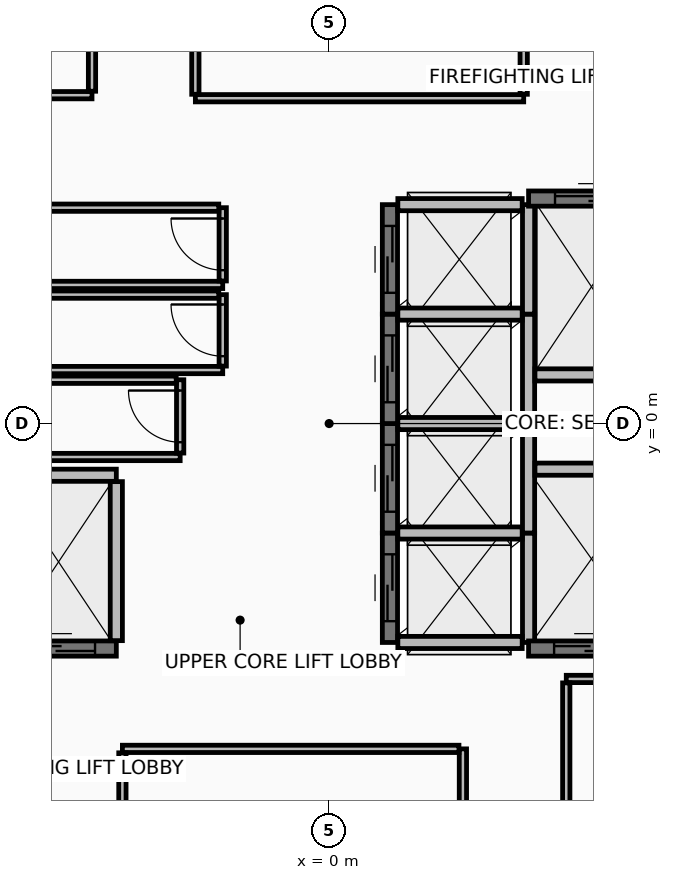
"""IFC4 building model, lengths in metres.
Left out: names, types, materials, properties, quantities, classifications, styles, units other than length and angle.
Written with IfcOpenShell. Run it as: python <this file> out.ifc"""

import sys

from ifc_helpers import new_model, si_unit, direction, frame, frame_2d, origin, place, context, subcontext, project, spatial, rectangle, extrude, element, fill, save


model = new_model("IFC4")
c1 = context("Model", 3, precision=1e-05, world=origin(), true_north=direction((0.0, 1.0)))
c2 = subcontext(c1, "Body", "Model", "MODEL_VIEW")
j1 = project(units=[si_unit("LENGTHUNIT", "METRE"), si_unit("PLANEANGLEUNIT", "RADIAN")], contexts=[c1])
p1 = place(None, origin())
s1 = spatial("IfcSite", under=j1, at=p1, CompositionType="ELEMENT")
p2 = place(p1, origin())
s2 = spatial("IfcBuilding", under=s1, at=p2, CompositionType="ELEMENT")
p3 = place(p2, frame((0.0, 0.0, 275.0)))
s3 = spatial("IfcBuildingStorey", under=s2, at=p3, CompositionType="ELEMENT", Elevation=275.0)
p4 = place(p3, frame((1.0, -3.6, 0.0), z_axis=(0.0, 0.0, 1.0), x_axis=(0.0, 1.0, 0.0)))
e1 = element("IfcWall", 1, at=p4, inside=s3, PredefinedType="SHEAR", context=c2, shape_type="SweptSolid", body=[
    extrude(rectangle(XDim=1.8, YDim=0.25, at=frame_2d((0.9, 0.0))), origin(), (0.0, 0.0, 1.0), 4.56),
])
p5 = place(p4, frame((0.35, 0.0, 0.0)))
e2 = element("IfcOpeningElement", 2, at=p5, cuts=e1, PredefinedType="OPENING", context=c2, shape_type="SweptSolid", body=[
    extrude(rectangle(XDim=1.1, YDim=2.2, at=frame_2d((0.55, 1.1))), frame((0.0, 0.135, 0.0), z_axis=(0.0, -1.0, 0.0), x_axis=(1.0, 0.0, 0.0)), (0.0, 0.0, 1.0), 0.27),
])
p6 = place(p3, frame((3.28, -3.6, 0.0), z_axis=(0.0, 0.0, 1.0), x_axis=(0.0, 1.0, 0.0)))
e3 = element("IfcWall", 3, at=p6, inside=s3, PredefinedType="PARTITIONING", context=c2, shape_type="SweptSolid", body=[
    extrude(rectangle(XDim=1.8, YDim=0.2, at=frame_2d((0.9, 0.0))), origin(), (0.0, 0.0, 1.0), 4.56),
])
for number, where, z_axis, x_axis in (
    (4, (1.13, -3.6, 0.0), (0.0, 0.0, 1.0), (1.0, 0.0, 0.0)),
    (5, (1.13, -1.8, 0.0), (0.0, 0.0, 1.0), (1.0, 0.0, 0.0)),
):
    element("IfcWall", number, at=place(p3, frame(where, z_axis=z_axis, x_axis=x_axis)), inside=s3, PredefinedType="PARTITIONING", context=c2, shape_type="SweptSolid", body=[
        extrude(rectangle(XDim=2.045, YDim=0.2, at=frame_2d((1.022, 0.0))), origin(), (0.0, 0.0, 1.0), 4.56),
    ])
p7 = place(p3, frame((1.0, -1.8, 0.0), z_axis=(0.0, 0.0, 1.0), x_axis=(0.0, 1.0, 0.0)))
e6 = element("IfcWall", 6, at=p7, inside=s3, PredefinedType="SHEAR", context=c2, shape_type="SweptSolid", body=[
    extrude(rectangle(XDim=1.8, YDim=0.25, at=frame_2d((0.9, 0.0))), origin(), (0.0, 0.0, 1.0), 4.56),
])
p8 = place(p7, frame((0.35, 0.0, 0.0)))
e7 = element("IfcOpeningElement", 7, at=p8, cuts=e6, PredefinedType="OPENING", context=c2, shape_type="SweptSolid", body=[
    extrude(rectangle(XDim=1.1, YDim=2.2, at=frame_2d((0.55, 1.1))), frame((0.0, 0.135, 0.0), z_axis=(0.0, -1.0, 0.0), x_axis=(1.0, 0.0, 0.0)), (0.0, 0.0, 1.0), 0.27),
])
p9 = place(p3, frame((3.28, -1.8, 0.0), z_axis=(0.0, 0.0, 1.0), x_axis=(0.0, 1.0, 0.0)))
e8 = element("IfcWall", 8, at=p9, inside=s3, PredefinedType="PARTITIONING", context=c2, shape_type="SweptSolid", body=[
    extrude(rectangle(XDim=1.8, YDim=0.2, at=frame_2d((0.9, 0.0))), origin(), (0.0, 0.0, 1.0), 4.56),
])
p10 = place(p3, frame((1.13, 0.0, 0.0), z_axis=(0.0, 0.0, 1.0), x_axis=(1.0, 0.0, 0.0)))
e9 = element("IfcWall", 9, at=p10, inside=s3, PredefinedType="PARTITIONING", context=c2, shape_type="SweptSolid", body=[
    extrude(rectangle(XDim=2.045, YDim=0.2, at=frame_2d((1.022, 0.0))), origin(), (0.0, 0.0, 1.0), 4.56),
])
p11 = place(p3, frame((1.0, 0.0, 0.0), z_axis=(0.0, 0.0, 1.0), x_axis=(0.0, 1.0, 0.0)))
e10 = element("IfcWall", 10, at=p11, inside=s3, PredefinedType="SHEAR", context=c2, shape_type="SweptSolid", body=[
    extrude(rectangle(XDim=1.8, YDim=0.25, at=frame_2d((0.9, 0.0))), origin(), (0.0, 0.0, 1.0), 4.56),
])
p12 = place(p11, frame((0.35, 0.0, 0.0)))
e11 = element("IfcOpeningElement", 11, at=p12, cuts=e10, PredefinedType="OPENING", context=c2, shape_type="SweptSolid", body=[
    extrude(rectangle(XDim=1.1, YDim=2.2, at=frame_2d((0.55, 1.1))), frame((0.0, 0.135, 0.0), z_axis=(0.0, -1.0, 0.0), x_axis=(1.0, 0.0, 0.0)), (0.0, 0.0, 1.0), 0.27),
])
p13 = place(p3, frame((3.28, 0.0, 0.0), z_axis=(0.0, 0.0, 1.0), x_axis=(0.0, 1.0, 0.0)))
e12 = element("IfcWall", 12, at=p13, inside=s3, PredefinedType="PARTITIONING", context=c2, shape_type="SweptSolid", body=[
    extrude(rectangle(XDim=1.8, YDim=0.2, at=frame_2d((0.9, 0.0))), origin(), (0.0, 0.0, 1.0), 4.56),
])
p14 = place(p3, frame((1.13, 1.8, 0.0), z_axis=(0.0, 0.0, 1.0), x_axis=(1.0, 0.0, 0.0)))
e13 = element("IfcWall", 13, at=p14, inside=s3, PredefinedType="PARTITIONING", context=c2, shape_type="SweptSolid", body=[
    extrude(rectangle(XDim=2.045, YDim=0.2, at=frame_2d((1.022, 0.0))), origin(), (0.0, 0.0, 1.0), 4.56),
])
p15 = place(p3, frame((1.0, 1.8, 0.0), z_axis=(0.0, 0.0, 1.0), x_axis=(0.0, 1.0, 0.0)))
e14 = element("IfcWall", 14, at=p15, inside=s3, PredefinedType="SHEAR", context=c2, shape_type="SweptSolid", body=[
    extrude(rectangle(XDim=1.8, YDim=0.25, at=frame_2d((0.9, 0.0))), origin(), (0.0, 0.0, 1.0), 4.56),
])
p16 = place(p15, frame((0.35, 0.0, 0.0)))
e15 = element("IfcOpeningElement", 15, at=p16, cuts=e14, PredefinedType="OPENING", context=c2, shape_type="SweptSolid", body=[
    extrude(rectangle(XDim=1.1, YDim=2.2, at=frame_2d((0.55, 1.1))), frame((0.0, 0.135, 0.0), z_axis=(0.0, -1.0, 0.0), x_axis=(1.0, 0.0, 0.0)), (0.0, 0.0, 1.0), 0.27),
])
p17 = place(p3, frame((3.28, 1.8, 0.0), z_axis=(0.0, 0.0, 1.0), x_axis=(0.0, 1.0, 0.0)))
e16 = element("IfcWall", 16, at=p17, inside=s3, PredefinedType="PARTITIONING", context=c2, shape_type="SweptSolid", body=[
    extrude(rectangle(XDim=1.8, YDim=0.2, at=frame_2d((0.9, 0.0))), origin(), (0.0, 0.0, 1.0), 4.56),
])
p18 = place(p3, frame((1.13, 3.6, 0.0), z_axis=(0.0, 0.0, 1.0), x_axis=(1.0, 0.0, 0.0)))
e17 = element("IfcWall", 17, at=p18, inside=s3, PredefinedType="PARTITIONING", context=c2, shape_type="SweptSolid", body=[
    extrude(rectangle(XDim=2.045, YDim=0.2, at=frame_2d((1.022, 0.0))), origin(), (0.0, 0.0, 1.0), 3.855),
])
p19 = place(p3, frame((-5.4, -3.7, 0.0), z_axis=(0.0, 0.0, 1.0), x_axis=(1.0, 0.0, 0.0)))
e18 = element("IfcWall", 18, at=p19, inside=s3, PredefinedType="SHEAR", context=c2, shape_type="SweptSolid", body=[
    extrude(rectangle(XDim=1.9, YDim=0.25, at=frame_2d((0.95, 0.0))), origin(), (0.0, 0.0, 1.0), 4.56),
])
p20 = place(p19, frame((0.35, 0.0, 0.0)))
e19 = element("IfcOpeningElement", 19, at=p20, cuts=e18, PredefinedType="OPENING", context=c2, shape_type="SweptSolid", body=[
    extrude(rectangle(XDim=1.2, YDim=2.2, at=frame_2d((0.6, 1.1))), frame((0.0, 0.135, 0.0), z_axis=(0.0, -1.0, 0.0), x_axis=(1.0, 0.0, 0.0)), (0.0, 0.0, 1.0), 0.27),
])
p21 = place(p3, frame((-5.27, -0.85, 0.0), z_axis=(0.0, 0.0, 1.0), x_axis=(1.0, 0.0, 0.0)))
e20 = element("IfcWall", 20, at=p21, inside=s3, PredefinedType="PARTITIONING", context=c2, shape_type="SweptSolid", body=[
    extrude(rectangle(XDim=1.77, YDim=0.2, at=frame_2d((0.885, 0.0))), origin(), (0.0, 0.0, 1.0), 4.56),
])
p22 = place(p3, frame((-3.5, -3.57, 0.0), z_axis=(0.0, 0.0, 1.0), x_axis=(0.0, 1.0, 0.0)))
e21 = element("IfcWall", 21, at=p22, inside=s3, PredefinedType="PARTITIONING", context=c2, shape_type="SweptSolid", body=[
    extrude(rectangle(XDim=2.615, YDim=0.2, at=frame_2d((1.308, 0.0))), origin(), (0.0, 0.0, 1.0), 4.56),
])
p23 = place(p3, frame((3.28, 3.7, 0.0), z_axis=(0.0, 0.0, 1.0), x_axis=(1.0, 0.0, 0.0)))
e22 = element("IfcWall", 22, at=p23, inside=s3, PredefinedType="SHEAR", context=c2, shape_type="SweptSolid", body=[
    extrude(rectangle(XDim=2.07, YDim=0.25, at=frame_2d((1.035, 0.0))), origin(), (0.0, 0.0, 1.0), 4.56),
])
p24 = place(p23, frame((0.435, 0.0, 0.0)))
e23 = element("IfcOpeningElement", 23, at=p24, cuts=e22, PredefinedType="OPENING", context=c2, shape_type="SweptSolid", body=[
    extrude(rectangle(XDim=1.2, YDim=2.2, at=frame_2d((0.6, 1.1))), frame((0.0, 0.135, 0.0), z_axis=(0.0, -1.0, 0.0), x_axis=(1.0, 0.0, 0.0)), (0.0, 0.0, 1.0), 0.27),
])
p25 = place(p3, frame((3.385, 0.8, 0.0), z_axis=(0.0, 0.0, 1.0), x_axis=(1.0, 0.0, 0.0)))
e24 = element("IfcWall", 24, at=p25, inside=s3, PredefinedType="PARTITIONING", context=c2, shape_type="SweptSolid", body=[
    extrude(rectangle(XDim=1.835, YDim=0.2, at=frame_2d((0.917, 0.0))), origin(), (0.0, 0.0, 1.0), 4.56),
])
p26 = place(p3, frame((3.28, -3.7, 0.0), z_axis=(0.0, 0.0, 1.0), x_axis=(1.0, 0.0, 0.0)))
e25 = element("IfcWall", 25, at=p26, inside=s3, PredefinedType="SHEAR", context=c2, shape_type="SweptSolid", body=[
    extrude(rectangle(XDim=1.94, YDim=0.25, at=frame_2d((0.97, 0.0))), origin(), (0.0, 0.0, 1.0), 4.56),
])
p27 = place(p26, frame((0.42, 0.0, 0.0)))
e26 = element("IfcOpeningElement", 26, at=p27, cuts=e25, PredefinedType="OPENING", context=c2, shape_type="SweptSolid", body=[
    extrude(rectangle(XDim=1.1, YDim=2.2, at=frame_2d((0.55, 1.1))), frame((0.0, 0.135, 0.0), z_axis=(0.0, -1.0, 0.0), x_axis=(1.0, 0.0, 0.0)), (0.0, 0.0, 1.0), 0.27),
])
p28 = place(p3, frame((3.385, -0.75, 0.0), z_axis=(0.0, 0.0, 1.0), x_axis=(1.0, 0.0, 0.0)))
e27 = element("IfcWall", 27, at=p28, inside=s3, PredefinedType="PARTITIONING", context=c2, shape_type="SweptSolid", body=[
    extrude(rectangle(XDim=1.835, YDim=0.2, at=frame_2d((0.917, 0.0))), origin(), (0.0, 0.0, 1.0), 4.56),
])
p29 = place(p3, frame((-5.22, 2.28, 0.0), z_axis=(0.0, 0.0, 1.0), x_axis=(1.0, 0.0, 0.0)))
e28 = element("IfcWall", 28, at=p29, inside=s3, PredefinedType="PARTITIONING", context=c2, shape_type="SweptSolid", body=[
    extrude(rectangle(XDim=3.47, YDim=0.12, at=frame_2d((1.735, 0.0))), origin(), (0.0, 0.0, 1.0), 4.56),
])
p30 = place(p3, frame((-1.75, 2.345, 0.0), z_axis=(0.0, 0.0, 1.0), x_axis=(0.0, 1.0, 0.0)))
e29 = element("IfcWall", 29, at=p30, inside=s3, PredefinedType="PARTITIONING", context=c2, shape_type="SweptSolid", body=[
    extrude(rectangle(XDim=1.205, YDim=0.12, at=frame_2d((0.603, 0.0))), origin(), (0.0, 0.0, 1.0), 4.56),
])
p31 = place(p30, frame((0.177, 0.0, 0.0)))
e30 = element("IfcOpeningElement", 30, at=p31, cuts=e29, PredefinedType="OPENING", context=c2, shape_type="SweptSolid", body=[
    extrude(rectangle(XDim=0.85, YDim=2.1, at=frame_2d((0.425, 1.05))), frame((0.0, 0.07, 0.0), z_axis=(0.0, -1.0, 0.0), x_axis=(1.0, 0.0, 0.0)), (0.0, 0.0, 1.0), 0.14),
])
p32 = place(p3, frame((-1.815, 3.55, 0.0), z_axis=(0.0, 0.0, 1.0), x_axis=(-1.0, 0.0, 0.0)))
e31 = element("IfcWall", 31, at=p32, inside=s3, PredefinedType="PARTITIONING", context=c2, shape_type="SweptSolid", body=[
    extrude(rectangle(XDim=3.405, YDim=0.12, at=frame_2d((1.703, 0.0))), origin(), (0.0, 0.0, 1.0), 4.56),
])
p33 = place(p3, frame((-5.22, 0.88, 0.0), z_axis=(0.0, 0.0, 1.0), x_axis=(1.0, 0.0, 0.0)))
e32 = element("IfcWall", 32, at=p33, inside=s3, PredefinedType="PARTITIONING", context=c2, shape_type="SweptSolid", body=[
    extrude(rectangle(XDim=3.47, YDim=0.12, at=frame_2d((1.735, 0.0))), origin(), (0.0, 0.0, 1.0), 4.56),
])
p34 = place(p3, frame((-1.75, 0.945, 0.0), z_axis=(0.0, 0.0, 1.0), x_axis=(0.0, 1.0, 0.0)))
e33 = element("IfcWall", 33, at=p34, inside=s3, PredefinedType="PARTITIONING", context=c2, shape_type="SweptSolid", body=[
    extrude(rectangle(XDim=1.175, YDim=0.12, at=frame_2d((0.587, 0.0))), origin(), (0.0, 0.0, 1.0), 4.56),
])
p35 = place(p34, frame((0.163, 0.0, 0.0)))
e34 = element("IfcOpeningElement", 34, at=p35, cuts=e33, PredefinedType="OPENING", context=c2, shape_type="SweptSolid", body=[
    extrude(rectangle(XDim=0.85, YDim=2.1, at=frame_2d((0.425, 1.05))), frame((0.0, 0.07, 0.0), z_axis=(0.0, -1.0, 0.0), x_axis=(1.0, 0.0, 0.0)), (0.0, 0.0, 1.0), 0.14),
])
p36 = place(p3, frame((-1.815, 2.12, 0.0), z_axis=(0.0, 0.0, 1.0), x_axis=(-1.0, 0.0, 0.0)))
e35 = element("IfcWall", 35, at=p36, inside=s3, PredefinedType="PARTITIONING", context=c2, shape_type="SweptSolid", body=[
    extrude(rectangle(XDim=3.405, YDim=0.12, at=frame_2d((1.703, 0.0))), origin(), (0.0, 0.0, 1.0), 4.56),
])
p37 = place(p3, frame((-5.22, -0.55, 0.0), z_axis=(0.0, 0.0, 1.0), x_axis=(1.0, 0.0, 0.0)))
e36 = element("IfcWall", 36, at=p37, inside=s3, PredefinedType="PARTITIONING", context=c2, shape_type="SweptSolid", body=[
    extrude(rectangle(XDim=2.77, YDim=0.12, at=frame_2d((1.385, 0.0))), origin(), (0.0, 0.0, 1.0), 4.56),
])
p38 = place(p3, frame((-2.45, -0.485, 0.0), z_axis=(0.0, 0.0, 1.0), x_axis=(0.0, 1.0, 0.0)))
e37 = element("IfcWall", 37, at=p38, inside=s3, PredefinedType="PARTITIONING", context=c2, shape_type="SweptSolid", body=[
    extrude(rectangle(XDim=1.205, YDim=0.12, at=frame_2d((0.603, 0.0))), origin(), (0.0, 0.0, 1.0), 4.56),
])
p39 = place(p38, frame((0.178, 0.0, 0.0)))
e38 = element("IfcOpeningElement", 38, at=p39, cuts=e37, PredefinedType="OPENING", context=c2, shape_type="SweptSolid", body=[
    extrude(rectangle(XDim=0.85, YDim=2.1, at=frame_2d((0.425, 1.05))), frame((0.0, 0.07, 0.0), z_axis=(0.0, -1.0, 0.0), x_axis=(1.0, 0.0, 0.0)), (0.0, 0.0, 1.0), 0.14),
])
p40 = place(p3, frame((-2.515, 0.72, 0.0), z_axis=(0.0, 0.0, 1.0), x_axis=(-1.0, 0.0, 0.0)))
e39 = element("IfcWall", 39, at=p40, inside=s3, PredefinedType="PARTITIONING", context=c2, shape_type="SweptSolid", body=[
    extrude(rectangle(XDim=2.705, YDim=0.12, at=frame_2d((1.353, 0.0))), origin(), (0.0, 0.0, 1.0), 4.56),
])
p41 = place(p3, frame((2.2, -7.42, 0.0), z_axis=(0.0, 0.0, 1.0), x_axis=(0.0, 1.0, 0.0)))
e40 = element("IfcWall", 40, at=p41, inside=s3, PredefinedType="PARTITIONING", context=c2, shape_type="SweptSolid", body=[
    extrude(rectangle(XDim=2.07, YDim=0.12, at=frame_2d((1.035, 0.0))), origin(), (0.0, 0.0, 1.0), 3.855),
])
p42 = place(p3, frame((2.135, -5.35, 0.0), z_axis=(0.0, 0.0, 1.0), x_axis=(-1.0, 0.0, 0.0)))
e41 = element("IfcWall", 41, at=p42, inside=s3, PredefinedType="PARTITIONING", context=c2, shape_type="SweptSolid", body=[
    extrude(rectangle(XDim=5.535, YDim=0.12, at=frame_2d((2.768, 0.0))), origin(), (0.0, 0.0, 1.0), 3.855),
])
p43 = place(p3, frame((-3.4, -5.415, 0.0), z_axis=(0.0, 0.0, 1.0), x_axis=(0.0, -1.0, 0.0)))
e42 = element("IfcWall", 42, at=p43, inside=s3, PredefinedType="PARTITIONING", context=c2, shape_type="SweptSolid", body=[
    extrude(rectangle(XDim=2.8, YDim=0.12, at=frame_2d((1.4, 0.0))), origin(), (0.0, 0.0, 1.0), 2.355),
])
p44 = place(p3, frame((-2.2, 5.35, 0.0), z_axis=(0.0, 0.0, 1.0), x_axis=(1.0, 0.0, 0.0)))
e43 = element("IfcWall", 43, at=p44, inside=s3, PredefinedType="PARTITIONING", context=c2, shape_type="SweptSolid", body=[
    extrude(rectangle(XDim=5.4, YDim=0.12, at=frame_2d((2.7, 0.0))), origin(), (0.0, 0.0, 1.0), 3.855),
])
p45 = place(p3, frame((3.2, 5.415, 0.0), z_axis=(0.0, 0.0, 1.0), x_axis=(0.0, 1.0, 0.0)))
e44 = element("IfcWall", 44, at=p45, inside=s3, PredefinedType="PARTITIONING", context=c2, shape_type="SweptSolid", body=[
    extrude(rectangle(XDim=2.8, YDim=0.12, at=frame_2d((1.4, 0.0))), origin(), (0.0, 0.0, 1.0), 2.355),
])
p46 = place(p3, frame((-2.2, 7.42, 0.0), z_axis=(0.0, 0.0, 1.0), x_axis=(0.0, -1.0, 0.0)))
e45 = element("IfcWall", 45, at=p46, inside=s3, PredefinedType="PARTITIONING", context=c2, shape_type="SweptSolid", body=[
    extrude(rectangle(XDim=2.005, YDim=0.12, at=frame_2d((1.002, 0.0))), origin(), (0.0, 0.0, 1.0), 3.855),
])
p47 = place(p3, frame((-6.2, 5.4, 0.0), z_axis=(0.0, 0.0, 1.0), x_axis=(1.0, 0.0, 0.0)))
e46 = element("IfcWall", 46, at=p47, inside=s3, PredefinedType="PARTITIONING", context=c2, shape_type="SweptSolid", body=[
    extrude(rectangle(XDim=2.3, YDim=0.12, at=frame_2d((1.15, 0.0))), origin(), (0.0, 0.0, 1.0), 4.56),
])
p48 = place(p3, frame((-3.9, 5.465, 0.0), z_axis=(0.0, 0.0, 1.0), x_axis=(0.0, 1.0, 0.0)))
e47 = element("IfcWall", 47, at=p48, inside=s3, PredefinedType="PARTITIONING", context=c2, shape_type="SweptSolid", body=[
    extrude(rectangle(XDim=2.75, YDim=0.12, at=frame_2d((1.375, 0.0))), origin(), (0.0, 0.0, 1.0), 3.855),
])
p49 = place(p3, frame((7.735, -4.2, 0.0), z_axis=(0.0, 0.0, 1.0), x_axis=(-1.0, 0.0, 0.0)))
e48 = element("IfcWall", 48, at=p49, inside=s3, PredefinedType="PARTITIONING", context=c2, shape_type="SweptSolid", body=[
    extrude(rectangle(XDim=3.835, YDim=0.12, at=frame_2d((1.917, 0.0))), origin(), (0.0, 0.0, 1.0), 4.56),
])
p50 = place(p3, frame((3.9, -4.265, 0.0), z_axis=(0.0, 0.0, 1.0), x_axis=(0.0, -1.0, 0.0)))
e49 = element("IfcWall", 49, at=p50, inside=s3, PredefinedType="PARTITIONING", context=c2, shape_type="SweptSolid", body=[
    extrude(rectangle(XDim=3.95, YDim=0.12, at=frame_2d((1.975, 0.0))), origin(), (0.0, 0.0, 1.0), 3.855),
])
p51 = place(p5, origin())
e50 = element("IfcDoor", 50, at=p51, inside=s3, OperationType="SLIDING_TO_LEFT", PredefinedType="DOOR", context=c2, shape_type="SweptSolid", body=[
    extrude(rectangle(XDim=1.1, YDim=2.2, at=frame_2d((0.55, 1.1))), frame((0.0, 0.025, 0.0), z_axis=(0.0, -1.0, 0.0), x_axis=(1.0, 0.0, 0.0)), (0.0, 0.0, 1.0), 0.05),
])
fill(e2, e50)
p52 = place(p8, origin())
e51 = element("IfcDoor", 51, at=p52, inside=s3, OperationType="SLIDING_TO_LEFT", PredefinedType="DOOR", context=c2, shape_type="SweptSolid", body=[
    extrude(rectangle(XDim=1.1, YDim=2.2, at=frame_2d((0.55, 1.1))), frame((0.0, 0.025, 0.0), z_axis=(0.0, -1.0, 0.0), x_axis=(1.0, 0.0, 0.0)), (0.0, 0.0, 1.0), 0.05),
])
fill(e7, e51)
p53 = place(p12, origin())
e52 = element("IfcDoor", 52, at=p53, inside=s3, OperationType="SLIDING_TO_LEFT", PredefinedType="DOOR", context=c2, shape_type="SweptSolid", body=[
    extrude(rectangle(XDim=1.1, YDim=2.2, at=frame_2d((0.55, 1.1))), frame((0.0, 0.025, 0.0), z_axis=(0.0, -1.0, 0.0), x_axis=(1.0, 0.0, 0.0)), (0.0, 0.0, 1.0), 0.05),
])
fill(e11, e52)
p54 = place(p16, origin())
e53 = element("IfcDoor", 53, at=p54, inside=s3, OperationType="SLIDING_TO_LEFT", PredefinedType="DOOR", context=c2, shape_type="SweptSolid", body=[
    extrude(rectangle(XDim=1.1, YDim=2.2, at=frame_2d((0.55, 1.1))), frame((0.0, 0.025, 0.0), z_axis=(0.0, -1.0, 0.0), x_axis=(1.0, 0.0, 0.0)), (0.0, 0.0, 1.0), 0.05),
])
fill(e15, e53)
p55 = place(p20, origin())
e54 = element("IfcDoor", 54, at=p55, inside=s3, OperationType="SLIDING_TO_RIGHT", PredefinedType="DOOR", context=c2, shape_type="SweptSolid", body=[
    extrude(rectangle(XDim=1.2, YDim=2.2, at=frame_2d((0.6, 1.1))), frame((0.0, 0.025, 0.0), z_axis=(0.0, -1.0, 0.0), x_axis=(1.0, 0.0, 0.0)), (0.0, 0.0, 1.0), 0.05),
])
fill(e19, e54)
p56 = place(p24, origin())
e55 = element("IfcDoor", 55, at=p56, inside=s3, OperationType="SLIDING_TO_RIGHT", PredefinedType="DOOR", context=c2, shape_type="SweptSolid", body=[
    extrude(rectangle(XDim=1.2, YDim=2.2, at=frame_2d((0.6, 1.1))), frame((0.0, 0.025, 0.0), z_axis=(0.0, -1.0, 0.0), x_axis=(1.0, 0.0, 0.0)), (0.0, 0.0, 1.0), 0.05),
])
fill(e23, e55)
p57 = place(p27, origin())
e56 = element("IfcDoor", 56, at=p57, inside=s3, OperationType="SLIDING_TO_LEFT", PredefinedType="DOOR", context=c2, shape_type="SweptSolid", body=[
    extrude(rectangle(XDim=1.1, YDim=2.2, at=frame_2d((0.55, 1.1))), frame((0.0, 0.025, 0.0), z_axis=(0.0, -1.0, 0.0), x_axis=(1.0, 0.0, 0.0)), (0.0, 0.0, 1.0), 0.05),
])
fill(e26, e56)
p58 = place(p31, frame((0.85, 0.0, 0.0), z_axis=(0.0, 0.0, 1.0), x_axis=(-1.0, 0.0, 0.0)))
e57 = element("IfcDoor", 57, at=p58, inside=s3, OperationType="SINGLE_SWING_RIGHT", PredefinedType="DOOR", context=c2, shape_type="SweptSolid", body=[
    extrude(rectangle(XDim=0.85, YDim=2.1, at=frame_2d((0.425, 1.05))), frame((0.0, 0.025, 0.0), z_axis=(0.0, -1.0, 0.0), x_axis=(1.0, 0.0, 0.0)), (0.0, 0.0, 1.0), 0.05),
])
fill(e30, e57)
p59 = place(p35, frame((0.85, 0.0, 0.0), z_axis=(0.0, 0.0, 1.0), x_axis=(-1.0, 0.0, 0.0)))
e58 = element("IfcDoor", 58, at=p59, inside=s3, OperationType="SINGLE_SWING_RIGHT", PredefinedType="DOOR", context=c2, shape_type="SweptSolid", body=[
    extrude(rectangle(XDim=0.85, YDim=2.1, at=frame_2d((0.425, 1.05))), frame((0.0, 0.025, 0.0), z_axis=(0.0, -1.0, 0.0), x_axis=(1.0, 0.0, 0.0)), (0.0, 0.0, 1.0), 0.05),
])
fill(e34, e58)
p60 = place(p39, frame((0.85, 0.0, 0.0), z_axis=(0.0, 0.0, 1.0), x_axis=(-1.0, 0.0, 0.0)))
e59 = element("IfcDoor", 59, at=p60, inside=s3, OperationType="SINGLE_SWING_RIGHT", PredefinedType="DOOR", context=c2, shape_type="SweptSolid", body=[
    extrude(rectangle(XDim=0.85, YDim=2.1, at=frame_2d((0.425, 1.05))), frame((0.0, 0.025, 0.0), z_axis=(0.0, -1.0, 0.0), x_axis=(1.0, 0.0, 0.0)), (0.0, 0.0, 1.0), 0.05),
])
fill(e38, e59)
save(model, sys.argv[1])
